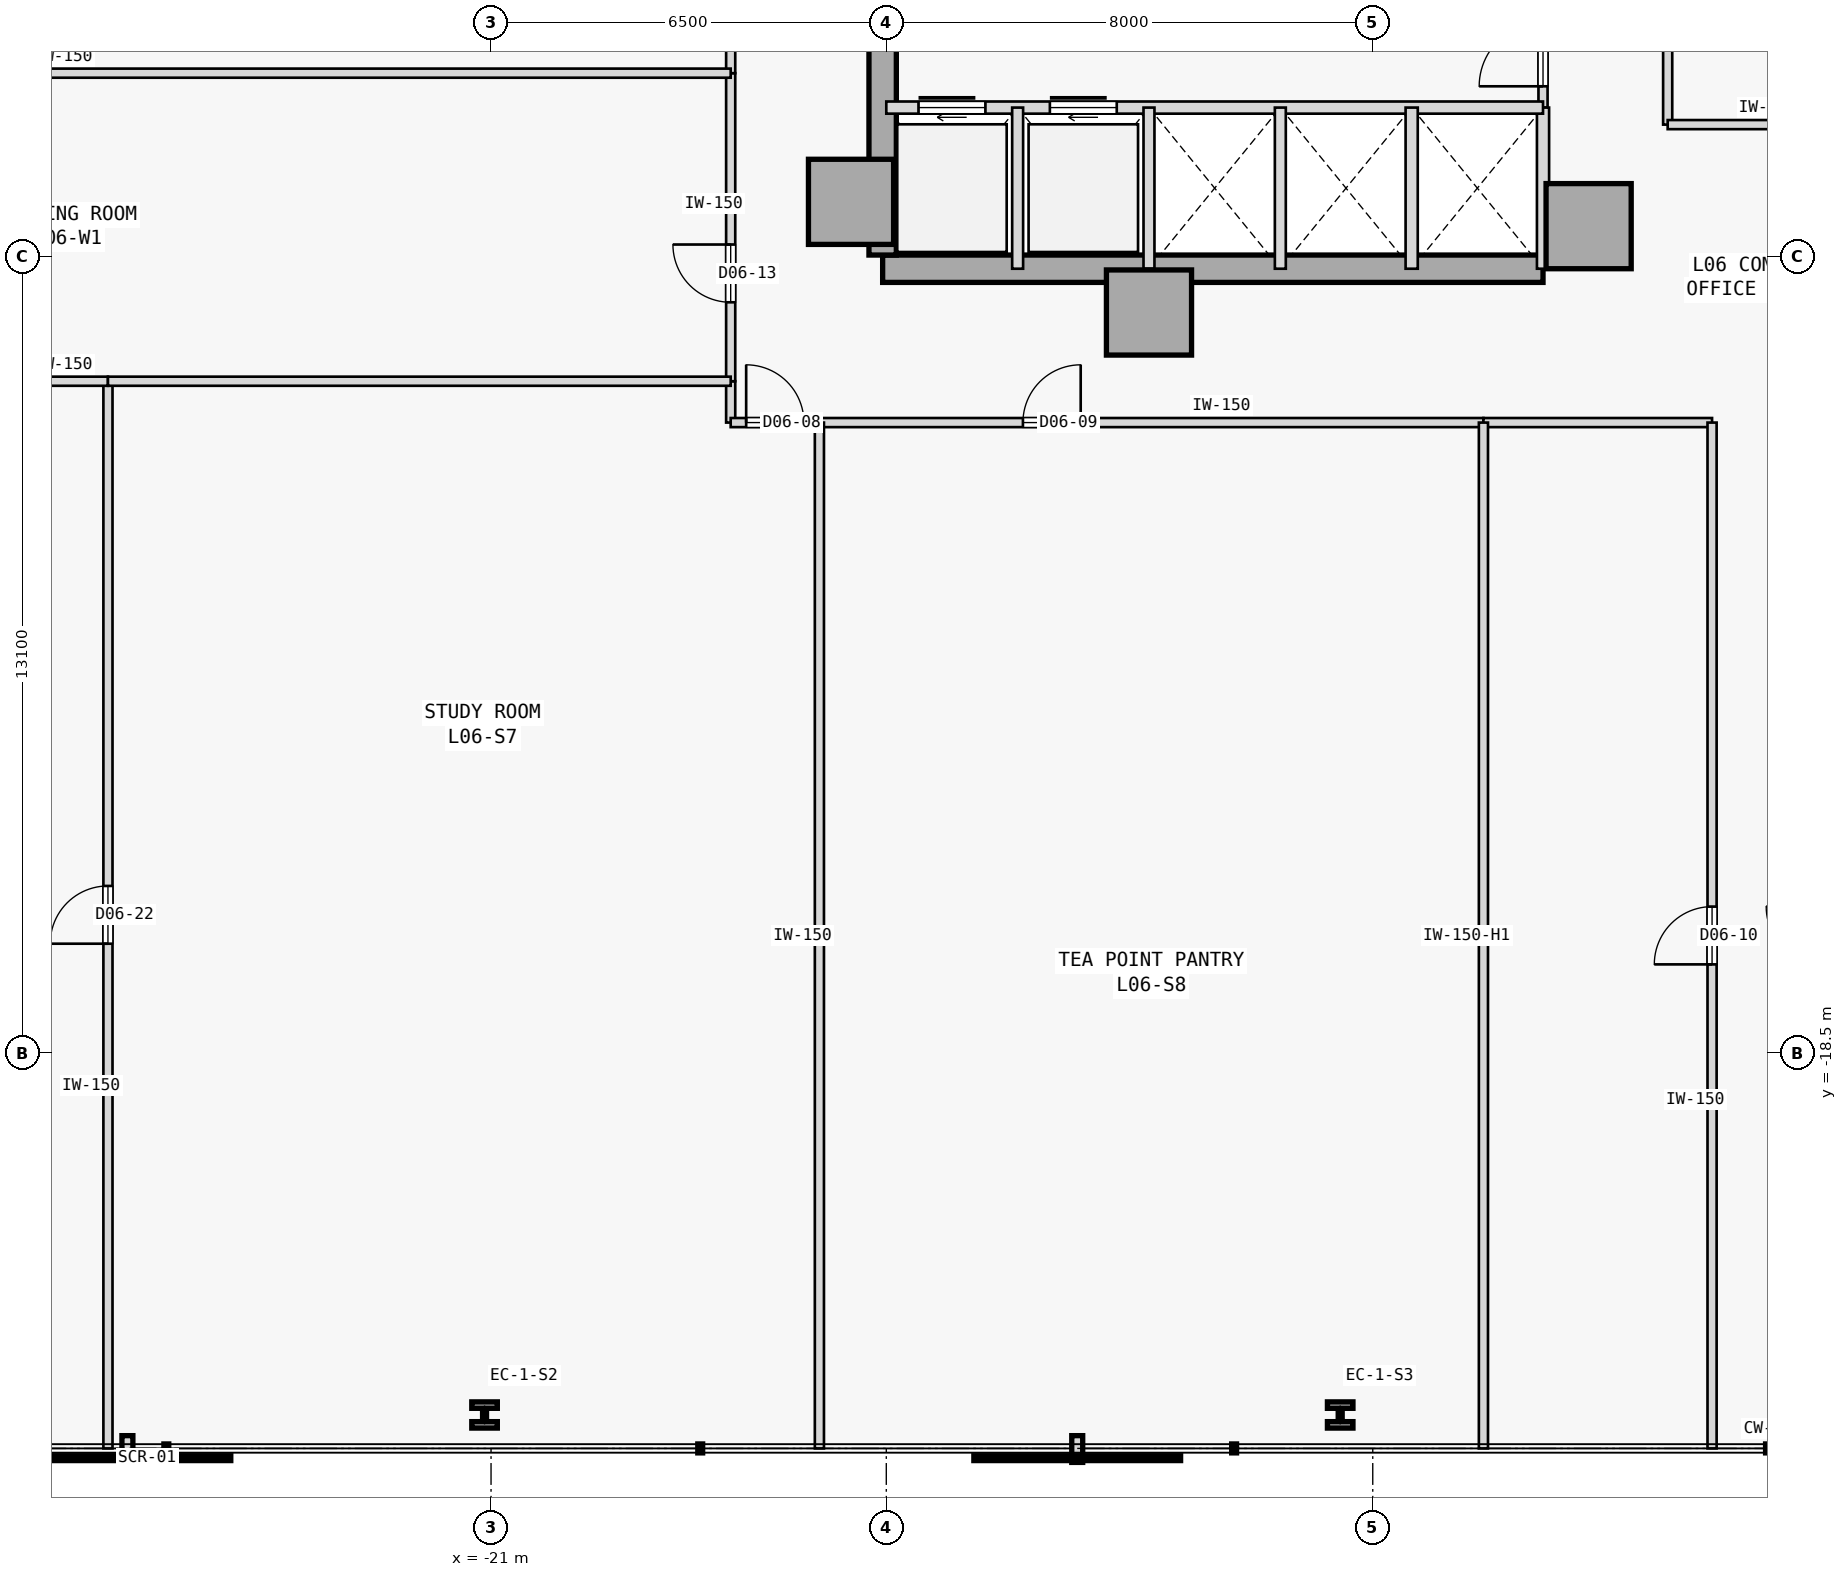
"""IFC4 building model, lengths in metres.
Left out: names, types, materials, properties, quantities, classifications, styles, units other than length and angle.
Written with IfcOpenShell. Run it as: python <this file> out.ifc"""

import sys

from ifc_helpers import new_model, si_unit, direction, frame, frame_2d, origin, origin_2d, place, context, subcontext, project, spatial, rectangle, i_section, extrude, element, fill, save


model = new_model("IFC4")
c1 = context("Model", 3, precision=1e-05, world=origin(), true_north=direction((0.0, 1.0)))
c2 = subcontext(c1, "Body", "Model", "MODEL_VIEW")
j1 = project(units=[si_unit("LENGTHUNIT", "METRE"), si_unit("PLANEANGLEUNIT", "RADIAN")], contexts=[c1])
p1 = place(None, origin())
s1 = spatial("IfcSite", under=j1, at=p1, CompositionType="ELEMENT")
p2 = place(p1, origin())
s2 = spatial("IfcBuilding", under=s1, at=p2, CompositionType="ELEMENT")
p3 = place(p2, frame((0.0, 0.0, 29.4)))
s3 = spatial("IfcBuildingStorey", under=s2, at=p3, CompositionType="ELEMENT", Elevation=29.4)
for number, where, z_axis, x_axis in (
    (1, (-15.08, -4.5, 0.0), (0.0, 0.0, 1.0), (1.0, 0.0, 0.0)),
    (2, (-10.18, -6.32, 0.0), (0.0, 0.0, 1.0), (1.0, 0.0, 0.0)),
    (3, (-2.95, -4.9, 0.0), (0.0, 0.0, 1.0), (1.0, 0.0, 0.0)),
):
    element("IfcColumn", number, at=place(p3, frame(where, z_axis=z_axis, x_axis=x_axis)), inside=s3, PredefinedType="COLUMN", context=c2, shape_type="SweptSolid", body=[
        extrude(rectangle(XDim=1.4, YDim=1.4, at=origin_2d()), origin(), (0.0, 0.0, 1.0), 3.8),
    ])
p4 = place(p3, frame((-14.56, -5.6, 0.0), z_axis=(0.0, 0.0, 1.0), x_axis=(1.0, 0.0, 0.0)))
e4 = element("IfcWall", 4, at=p4, inside=s3, PredefinedType="SHEAR", context=c2, shape_type="SweptSolid", body=[
    extrude(rectangle(XDim=10.86, YDim=0.45, at=frame_2d((5.43, 0.0))), origin(), (0.0, 0.0, 1.0), 3.575),
])
p5 = place(p3, frame((-14.56, -5.375, 0.0), z_axis=(0.0, 0.0, 1.0), x_axis=(0.0, 1.0, 0.0)))
e5 = element("IfcWall", 5, at=p5, inside=s3, PredefinedType="SHEAR", context=c2, shape_type="SweptSolid", body=[
    extrude(rectangle(XDim=10.75, YDim=0.45, at=frame_2d((5.375, 0.0))), origin(), (0.0, 0.0, 1.0), 3.575),
])
for number, where, z_axis, x_axis in (
    (6, (-21.107, -24.45, 0.0), (0.0, 0.0, 1.0), (1.0, 0.0, 0.0)),
    (7, (-7.036, -24.45, 0.0), (0.0, 0.0, 1.0), (1.0, 0.0, 0.0)),
):
    element("IfcColumn", number, at=place(p3, frame(where, z_axis=z_axis, x_axis=x_axis)), inside=s3, PredefinedType="COLUMN", context=c2, shape_type="SweptSolid", body=[
        extrude(i_section(OverallWidth=0.42, OverallDepth=0.431, WebThickness=0.065, FlangeThickness=0.106, FilletRadius=0.015, at=origin_2d()), origin(), (0.0, 0.0, 1.0), 3.8),
    ])
p6 = place(p3, frame((-3.7, -2.95, 0.0), z_axis=(0.0, 0.0, 1.0), x_axis=(0.0, 1.0, 0.0)))
e8 = element("IfcWall", 8, at=p6, inside=s3, PredefinedType="PARTITIONING", context=c2, shape_type="SweptSolid", body=[
    extrude(rectangle(XDim=1.8, YDim=0.15, at=frame_2d((0.9, 0.0))), origin(), (0.0, 0.0, 1.0), 3.575),
])
p7 = place(p6, frame((0.35, 0.0, 0.0)))
e9 = element("IfcOpeningElement", 9, at=p7, cuts=e8, PredefinedType="OPENING", context=c2, shape_type="SweptSolid", body=[
    extrude(rectangle(XDim=1.05, YDim=2.18, at=frame_2d((0.525, 1.09))), frame((0.0, 0.085, 0.0), z_axis=(0.0, -1.0, 0.0), x_axis=(1.0, 0.0, 0.0)), (0.0, 0.0, 1.0), 0.17),
])
p8 = place(p3, frame((-3.7, -5.6, 0.0), z_axis=(0.0, 0.0, 1.0), x_axis=(0.0, 1.0, 0.0)))
e10 = element("IfcWall", 10, at=p8, inside=s3, PredefinedType="STANDARD", context=c2, shape_type="SweptSolid", body=[
    extrude(rectangle(XDim=2.65, YDim=0.2, at=frame_2d((1.325, 0.0))), origin(), (0.0, 0.0, 1.0), 3.575),
])
p9 = place(p3, frame((-14.5, -2.95, 0.0), z_axis=(0.0, 0.0, 1.0), x_axis=(1.0, 0.0, 0.0)))
e11 = element("IfcWall", 11, at=p9, inside=s3, PredefinedType="STANDARD", context=c2, shape_type="SweptSolid", body=[
    extrude(rectangle(XDim=10.8, YDim=0.2, at=frame_2d((5.4, 0.0))), origin(), (0.0, 0.0, 1.0), 3.575),
])
p10 = place(p9, frame((0.53, 0.0, 0.0)))
e12 = element("IfcOpeningElement", 12, at=p10, cuts=e11, PredefinedType="OPENING", context=c2, shape_type="SweptSolid", body=[
    extrude(rectangle(XDim=1.1, YDim=2.15, at=frame_2d((0.55, 1.075))), frame((0.0, 0.11, 0.0), z_axis=(0.0, -1.0, 0.0), x_axis=(1.0, 0.0, 0.0)), (0.0, 0.0, 1.0), 0.22),
])
p11 = place(p9, frame((2.69, 0.0, 0.0)))
e13 = element("IfcOpeningElement", 13, at=p11, cuts=e11, PredefinedType="OPENING", context=c2, shape_type="SweptSolid", body=[
    extrude(rectangle(XDim=1.1, YDim=2.15, at=frame_2d((0.55, 1.075))), frame((0.0, 0.11, 0.0), z_axis=(0.0, -1.0, 0.0), x_axis=(1.0, 0.0, 0.0)), (0.0, 0.0, 1.0), 0.22),
])
p12 = place(p3, frame((-5.86, -5.6, 0.0), z_axis=(0.0, 0.0, 1.0), x_axis=(0.0, 1.0, 0.0)))
e14 = element("IfcWall", 14, at=p12, inside=s3, PredefinedType="STANDARD", context=c2, shape_type="SweptSolid", body=[
    extrude(rectangle(XDim=2.65, YDim=0.2, at=frame_2d((1.325, 0.0))), origin(), (0.0, 0.0, 1.0), 3.575),
])
for number, where, z_axis, x_axis in (
    (15, (-12.34, -5.6, 0.0), (0.0, 0.0, 1.0), (0.0, 1.0, 0.0)),
    (16, (-10.18, -5.6, 0.0), (0.0, 0.0, 1.0), (0.0, 1.0, 0.0)),
    (17, (-8.02, -5.6, 0.0), (0.0, 0.0, 1.0), (0.0, 1.0, 0.0)),
):
    element("IfcWall", number, at=place(p3, frame(where, z_axis=z_axis, x_axis=x_axis)), inside=s3, PredefinedType="STANDARD", context=c2, shape_type="SweptSolid", body=[
        extrude(rectangle(XDim=2.65, YDim=0.18, at=frame_2d((1.325, 0.0))), origin(), (0.0, 0.0, 1.0), 3.575),
    ])
p13 = place(p3, frame((-1.65, -3.23, 0.0), z_axis=(0.0, 0.0, 1.0), x_axis=(0.0, 1.0, 0.0)))
e18 = element("IfcWall", 18, at=p13, inside=s3, PredefinedType="PARTITIONING", context=c2, shape_type="SweptSolid", body=[
    extrude(rectangle(XDim=6.46, YDim=0.15, at=frame_2d((3.23, 0.0))), origin(), (0.0, 0.0, 1.0), 3.575),
])
p14 = place(p13, frame((2.755, 0.0, 0.0)))
e19 = element("IfcOpeningElement", 19, at=p14, cuts=e18, PredefinedType="OPENING", context=c2, shape_type="SweptSolid", body=[
    extrude(rectangle(XDim=0.95, YDim=2.15, at=frame_2d((0.475, 1.075))), frame((0.0, 0.085, 0.0), z_axis=(0.0, -1.0, 0.0), x_axis=(1.0, 0.0, 0.0)), (0.0, 0.0, 1.0), 0.17),
])
p15 = place(p3, frame((-1.65, -3.23, 0.0), z_axis=(0.0, 0.0, 1.0), x_axis=(1.0, 0.0, 0.0)))
e20 = element("IfcWall", 20, at=p15, inside=s3, PredefinedType="PARTITIONING", context=c2, shape_type="SweptSolid", body=[
    extrude(rectangle(XDim=3.3, YDim=0.15, at=frame_2d((1.65, 0.0))), origin(), (0.0, 0.0, 1.0), 3.575),
])
p16 = place(p3, frame((-17.059, -8.13, 0.0), z_axis=(0.0, 0.0, 1.0), x_axis=(0.0, 1.0, 0.0)))
e21 = element("IfcWall", 21, at=p16, inside=s3, PredefinedType="PARTITIONING", context=c2, shape_type="SweptSolid", body=[
    extrude(rectangle(XDim=0.68, YDim=0.15, at=frame_2d((0.34, 0.0))), origin(), (0.0, 0.0, 1.0), 3.575),
])
p17 = place(p3, frame((-17.059, -8.13, 0.0), z_axis=(0.0, 0.0, 1.0), x_axis=(1.0, 0.0, 0.0)))
e22 = element("IfcWall", 22, at=p17, inside=s3, PredefinedType="PARTITIONING", context=c2, shape_type="SweptSolid", body=[
    extrude(rectangle(XDim=1.459, YDim=0.15, at=frame_2d((0.729, 0.0))), origin(), (0.0, 0.0, 1.0), 3.575),
])
p18 = place(p17, frame((0.254, 0.0, 0.0)))
e23 = element("IfcOpeningElement", 23, at=p18, cuts=e22, PredefinedType="OPENING", context=c2, shape_type="SweptSolid", body=[
    extrude(rectangle(XDim=0.95, YDim=2.15, at=frame_2d((0.475, 1.075))), frame((0.0, 0.085, 0.0), z_axis=(0.0, -1.0, 0.0), x_axis=(1.0, 0.0, 0.0)), (0.0, 0.0, 1.0), 0.17),
])
p19 = place(p3, frame((-15.6, -8.13, 0.0), z_axis=(0.0, 0.0, 1.0), x_axis=(1.0, 0.0, 0.0)))
e24 = element("IfcWall", 24, at=p19, inside=s3, PredefinedType="PARTITIONING", context=c2, shape_type="SweptSolid", body=[
    extrude(rectangle(XDim=10.92, YDim=0.15, at=frame_2d((5.46, 0.0))), origin(), (0.0, 0.0, 1.0), 3.575),
])
p20 = place(p19, frame((3.347, 0.0, 0.0)))
e25 = element("IfcOpeningElement", 25, at=p20, cuts=e24, PredefinedType="OPENING", context=c2, shape_type="SweptSolid", body=[
    extrude(rectangle(XDim=0.95, YDim=2.15, at=frame_2d((0.475, 1.075))), frame((0.0, 0.085, 0.0), z_axis=(0.0, -1.0, 0.0), x_axis=(1.0, 0.0, 0.0)), (0.0, 0.0, 1.0), 0.17),
])
p21 = place(p3, frame((-4.68, -8.13, 0.0), z_axis=(0.0, 0.0, 1.0), x_axis=(1.0, 0.0, 0.0)))
e26 = element("IfcWall", 26, at=p21, inside=s3, PredefinedType="PARTITIONING", context=c2, shape_type="SweptSolid", body=[
    extrude(rectangle(XDim=3.76, YDim=0.15, at=frame_2d((1.88, 0.0))), origin(), (0.0, 0.0, 1.0), 3.575),
])
p22 = place(p3, frame((-0.92, -25.0, 0.0), z_axis=(0.0, 0.0, 1.0), x_axis=(0.0, 1.0, 0.0)))
e27 = element("IfcWall", 27, at=p22, inside=s3, PredefinedType="PARTITIONING", context=c2, shape_type="SweptSolid", body=[
    extrude(rectangle(XDim=16.87, YDim=0.15, at=frame_2d((8.435, 0.0))), origin(), (0.0, 0.0, 1.0), 3.575),
])
p23 = place(p22, frame((7.96, 0.0, 0.0)))
e28 = element("IfcOpeningElement", 28, at=p23, cuts=e27, PredefinedType="OPENING", context=c2, shape_type="SweptSolid", body=[
    extrude(rectangle(XDim=0.95, YDim=2.15, at=frame_2d((0.475, 1.075))), frame((0.0, 0.085, 0.0), z_axis=(0.0, -1.0, 0.0), x_axis=(1.0, 0.0, 0.0)), (0.0, 0.0, 1.0), 0.17),
])
p24 = place(p3, frame((-17.059, -7.45, 0.0), z_axis=(0.0, 0.0, 1.0), x_axis=(0.0, 1.0, 0.0)))
e29 = element("IfcWall", 29, at=p24, inside=s3, PredefinedType="PARTITIONING", context=c2, shape_type="SweptSolid", body=[
    extrude(rectangle(XDim=5.066, YDim=0.15, at=frame_2d((2.533, 0.0))), origin(), (0.0, 0.0, 1.0), 3.575),
])
p25 = place(p24, frame((1.298, 0.0, 0.0)))
e30 = element("IfcOpeningElement", 30, at=p25, cuts=e29, PredefinedType="OPENING", context=c2, shape_type="SweptSolid", body=[
    extrude(rectangle(XDim=0.95, YDim=2.15, at=frame_2d((0.475, 1.075))), frame((0.0, 0.085, 0.0), z_axis=(0.0, -1.0, 0.0), x_axis=(1.0, 0.0, 0.0)), (0.0, 0.0, 1.0), 0.17),
])
p26 = place(p3, frame((-17.059, -2.384, 0.0), z_axis=(0.0, 0.0, 1.0), x_axis=(0.0, 1.0, 0.0)))
e31 = element("IfcWall", 31, at=p26, inside=s3, PredefinedType="PARTITIONING", context=c2, shape_type="SweptSolid", body=[
    extrude(rectangle(XDim=1.464, YDim=0.15, at=frame_2d((0.732, 0.0))), origin(), (0.0, 0.0, 1.0), 3.575),
])
p27 = place(p3, frame((-27.3, -25.0, 0.0), z_axis=(0.0, 0.0, 1.0), x_axis=(0.0, 1.0, 0.0)))
e32 = element("IfcWall", 32, at=p27, inside=s3, PredefinedType="PARTITIONING", context=c2, shape_type="SweptSolid", body=[
    extrude(rectangle(XDim=17.55, YDim=0.15, at=frame_2d((8.775, 0.0))), origin(), (0.0, 0.0, 1.0), 3.575),
])
p28 = place(p27, frame((8.3, 0.0, 0.0)))
e33 = element("IfcOpeningElement", 33, at=p28, cuts=e32, PredefinedType="OPENING", context=c2, shape_type="SweptSolid", body=[
    extrude(rectangle(XDim=0.95, YDim=2.15, at=frame_2d((0.475, 1.075))), frame((0.0, 0.085, 0.0), z_axis=(0.0, -1.0, 0.0), x_axis=(1.0, 0.0, 0.0)), (0.0, 0.0, 1.0), 0.17),
])
p29 = place(p3, frame((-39.0, -7.45, 0.0), z_axis=(0.0, 0.0, 1.0), x_axis=(1.0, 0.0, 0.0)))
e34 = element("IfcWall", 34, at=p29, inside=s3, PredefinedType="PARTITIONING", context=c2, shape_type="SweptSolid", body=[
    extrude(rectangle(XDim=11.7, YDim=0.15, at=frame_2d((5.85, 0.0))), origin(), (0.0, 0.0, 1.0), 3.575),
])
p30 = place(p3, frame((-15.6, -25.0, 0.0), z_axis=(0.0, 0.0, 1.0), x_axis=(0.0, 1.0, 0.0)))
e35 = element("IfcWall", 35, at=p30, inside=s3, PredefinedType="PARTITIONING", context=c2, shape_type="SweptSolid", body=[
    extrude(rectangle(XDim=16.87, YDim=0.15, at=frame_2d((8.435, 0.0))), origin(), (0.0, 0.0, 1.0), 3.575),
])
p31 = place(p3, frame((-27.3, -7.45, 0.0), z_axis=(0.0, 0.0, 1.0), x_axis=(1.0, 0.0, 0.0)))
e36 = element("IfcWall", 36, at=p31, inside=s3, PredefinedType="PARTITIONING", context=c2, shape_type="SweptSolid", body=[
    extrude(rectangle(XDim=10.241, YDim=0.15, at=frame_2d((5.121, 0.0))), origin(), (0.0, 0.0, 1.0), 3.575),
])
p32 = place(p3, frame((-4.68, -25.0, 0.0), z_axis=(0.0, 0.0, 1.0), x_axis=(0.0, 1.0, 0.0)))
e37 = element("IfcWall", 37, at=p32, inside=s3, PredefinedType="PARTITIONING", context=c2, shape_type="SweptSolid", body=[
    extrude(rectangle(XDim=16.87, YDim=0.15, at=frame_2d((8.435, 0.0))), origin(), (0.0, 0.0, 1.0), 3.125),
])
p33 = place(p3, frame((-39.0, -2.384, 0.0), z_axis=(0.0, 0.0, 1.0), x_axis=(1.0, 0.0, 0.0)))
e38 = element("IfcWall", 38, at=p33, inside=s3, PredefinedType="PARTITIONING", context=c2, shape_type="SweptSolid", body=[
    extrude(rectangle(XDim=21.941, YDim=0.15, at=frame_2d((10.97, 0.0))), origin(), (0.0, 0.0, 1.0), 3.575),
])
p34 = place(p7, origin())
e39 = element("IfcDoor", 39, at=p34, inside=s3, OperationType="SINGLE_SWING_LEFT", PredefinedType="DOOR", context=c2, shape_type="SweptSolid", body=[
    extrude(rectangle(XDim=1.05, YDim=2.18, at=frame_2d((0.525, 1.09))), frame((0.0, 0.025, 0.0), z_axis=(0.0, -1.0, 0.0), x_axis=(1.0, 0.0, 0.0)), (0.0, 0.0, 1.0), 0.05),
])
fill(e9, e39)
p35 = place(p10, origin())
e40 = element("IfcDoor", 40, at=p35, inside=s3, OperationType="SLIDING_TO_RIGHT", PredefinedType="DOOR", context=c2, shape_type="SweptSolid", body=[
    extrude(rectangle(XDim=1.1, YDim=2.15, at=frame_2d((0.55, 1.075))), frame((0.0, 0.025, 0.0), z_axis=(0.0, -1.0, 0.0), x_axis=(1.0, 0.0, 0.0)), (0.0, 0.0, 1.0), 0.05),
])
fill(e12, e40)
p36 = place(p11, origin())
e41 = element("IfcDoor", 41, at=p36, inside=s3, OperationType="SLIDING_TO_RIGHT", PredefinedType="DOOR", context=c2, shape_type="SweptSolid", body=[
    extrude(rectangle(XDim=1.1, YDim=2.15, at=frame_2d((0.55, 1.075))), frame((0.0, 0.025, 0.0), z_axis=(0.0, -1.0, 0.0), x_axis=(1.0, 0.0, 0.0)), (0.0, 0.0, 1.0), 0.05),
])
fill(e13, e41)
p37 = place(p18, origin())
e42 = element("IfcDoor", 42, at=p37, inside=s3, OperationType="SINGLE_SWING_LEFT", PredefinedType="DOOR", context=c2, shape_type="SweptSolid", body=[
    extrude(rectangle(XDim=0.95, YDim=2.15, at=frame_2d((0.475, 1.075))), frame((0.0, 0.025, 0.0), z_axis=(0.0, -1.0, 0.0), x_axis=(1.0, 0.0, 0.0)), (0.0, 0.0, 1.0), 0.05),
])
fill(e23, e42)
p38 = place(p20, origin())
e43 = element("IfcDoor", 43, at=p38, inside=s3, OperationType="SINGLE_SWING_RIGHT", PredefinedType="DOOR", context=c2, shape_type="SweptSolid", body=[
    extrude(rectangle(XDim=0.95, YDim=2.15, at=frame_2d((0.475, 1.075))), frame((0.0, 0.025, 0.0), z_axis=(0.0, -1.0, 0.0), x_axis=(1.0, 0.0, 0.0)), (0.0, 0.0, 1.0), 0.05),
])
fill(e25, e43)
p39 = place(p23, origin())
e44 = element("IfcDoor", 44, at=p39, inside=s3, OperationType="SINGLE_SWING_LEFT", PredefinedType="DOOR", context=c2, shape_type="SweptSolid", body=[
    extrude(rectangle(XDim=0.95, YDim=2.15, at=frame_2d((0.475, 1.075))), frame((0.0, 0.025, 0.0), z_axis=(0.0, -1.0, 0.0), x_axis=(1.0, 0.0, 0.0)), (0.0, 0.0, 1.0), 0.05),
])
fill(e28, e44)
p40 = place(p25, origin())
e45 = element("IfcDoor", 45, at=p40, inside=s3, OperationType="SINGLE_SWING_RIGHT", PredefinedType="DOOR", context=c2, shape_type="SweptSolid", body=[
    extrude(rectangle(XDim=0.95, YDim=2.15, at=frame_2d((0.475, 1.075))), frame((0.0, 0.025, 0.0), z_axis=(0.0, -1.0, 0.0), x_axis=(1.0, 0.0, 0.0)), (0.0, 0.0, 1.0), 0.05),
])
fill(e30, e45)
p41 = place(p28, origin())
e46 = element("IfcDoor", 46, at=p41, inside=s3, OperationType="SINGLE_SWING_LEFT", PredefinedType="DOOR", context=c2, shape_type="SweptSolid", body=[
    extrude(rectangle(XDim=0.95, YDim=2.15, at=frame_2d((0.475, 1.075))), frame((0.0, 0.025, 0.0), z_axis=(0.0, -1.0, 0.0), x_axis=(1.0, 0.0, 0.0)), (0.0, 0.0, 1.0), 0.05),
])
fill(e33, e46)
save(model, sys.argv[1])
